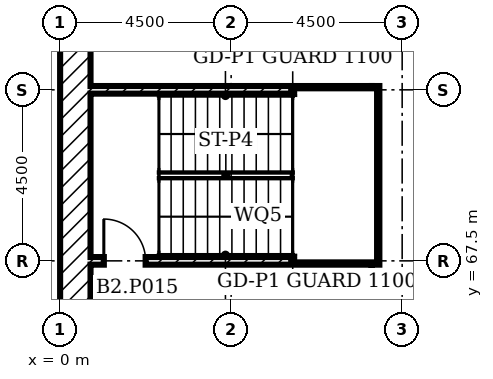
"""IFC4 building model, lengths in metres.
Left out: names, types, materials, properties, quantities, classifications, styles, units other than length and angle.
Written with IfcOpenShell. Run it as: python <this file> out.ifc"""

import sys

from ifc_helpers import new_model, si_unit, direction, frame, frame_2d, origin, place, context, subcontext, project, spatial, rectangle, extrude, element, fill, save


model = new_model("IFC4")
c1 = context("Model", 3, precision=1e-05, world=origin(), true_north=direction((0.0, 1.0)))
c2 = subcontext(c1, "Body", "Model", "MODEL_VIEW")
j1 = project(units=[si_unit("LENGTHUNIT", "METRE"), si_unit("PLANEANGLEUNIT", "RADIAN")], contexts=[c1])
p1 = place(None, origin())
s1 = spatial("IfcSite", under=j1, at=p1, CompositionType="ELEMENT")
p2 = place(p1, origin())
s2 = spatial("IfcBuilding", under=s1, at=p2, CompositionType="ELEMENT")
p3 = place(p2, frame((0.0, 0.0, -8.0)))
s3 = spatial("IfcBuildingStorey", under=s2, at=p3, CompositionType="ELEMENT", Elevation=-8.0)
p4 = place(p3, frame((0.4, 0.8, 0.0), z_axis=(0.0, 0.0, 1.0), x_axis=(0.0, 1.0, 0.0)))
e1 = element("IfcWall", 1, at=p4, inside=s3, PredefinedType="SOLIDWALL", context=c2, shape_type="SweptSolid", body=[
    extrude(rectangle(XDim=97.4, YDim=0.8, at=frame_2d((48.7, 0.0))), origin(), (0.0, 0.0, 1.0), 4.0),
])
p5 = place(p3, frame((8.3, 67.4, 0.0), z_axis=(0.0, 0.0, 1.0), x_axis=(0.0, 1.0, 0.0)))
e2 = element("IfcWall", 2, at=p5, inside=s3, PredefinedType="SOLIDWALL", context=c2, shape_type="SweptSolid", body=[
    extrude(rectangle(XDim=4.7, YDim=0.2, at=frame_2d((2.35, 0.0))), origin(), (0.0, 0.0, 1.0), 3.55),
])
p6 = place(p3, frame((0.8, 67.5, 0.0)))
e3 = element("IfcWall", 3, at=p6, inside=s3, PredefinedType="SOLIDWALL", context=c2, shape_type="SweptSolid", body=[
    extrude(rectangle(XDim=7.4, YDim=0.2, at=frame_2d((3.7, 0.0))), origin(), (0.0, 0.0, 1.0), 3.55),
])
p7 = place(p6, frame((0.35, 0.0, 0.0)))
e4 = element("IfcOpeningElement", 4, at=p7, cuts=e3, PredefinedType="OPENING", context=c2, shape_type="SweptSolid", body=[
    extrude(rectangle(XDim=1.1, YDim=2.1, at=frame_2d((0.55, 1.05))), frame((0.0, 0.11, 0.0), z_axis=(0.0, -1.0, 0.0), x_axis=(1.0, 0.0, 0.0)), (0.0, 0.0, 1.0), 0.22),
])
p8 = place(p3, frame((0.8, 72.0, 0.0)))
e5 = element("IfcWall", 5, at=p8, inside=s3, PredefinedType="SOLIDWALL", context=c2, shape_type="SweptSolid", body=[
    extrude(rectangle(XDim=7.4, YDim=0.2, at=frame_2d((3.7, 0.0))), origin(), (0.0, 0.0, 1.0), 3.55),
])
for number, where, z_axis, x_axis in (
    (6, (6.22, 71.9, 0.0), (0.0, 0.0, 1.0), (0.0, -1.0, 0.0)),
    (7, (7.6, 71.9, 0.0), (0.0, 0.0, 1.0), (0.0, -1.0, 0.0)),
):
    element("IfcWall", number, at=place(p3, frame(where, z_axis=z_axis, x_axis=x_axis)), inside=s3, PredefinedType="SOLIDWALL", context=c2, shape_type="SweptSolid", body=[
        extrude(rectangle(XDim=4.3, YDim=0.2, at=frame_2d((2.15, 0.0))), origin(), (0.0, 0.0, 1.0), 1.8),
    ])
p9 = place(p7, origin())
e8 = element("IfcDoor", 8, at=p9, inside=s3, OperationType="SINGLE_SWING_RIGHT", PredefinedType="DOOR", context=c2, shape_type="SweptSolid", body=[
    extrude(rectangle(XDim=1.1, YDim=2.1, at=frame_2d((0.55, 1.05))), frame((0.0, 0.025, 0.0), z_axis=(0.0, -1.0, 0.0), x_axis=(1.0, 0.0, 0.0)), (0.0, 0.0, 1.0), 0.05),
])
fill(e4, e8)
save(model, sys.argv[1])
